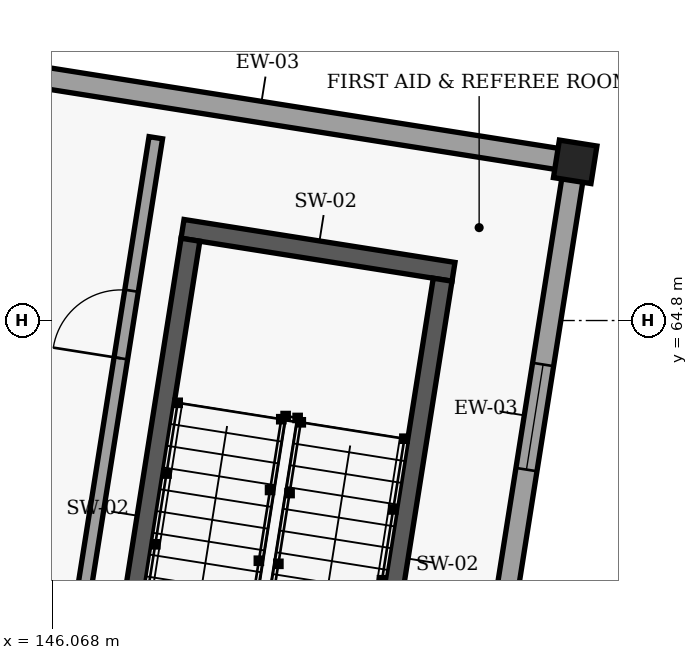
"""IFC4 building model, lengths in metres.
Left out: names, types, materials, properties, quantities, classifications, styles, units other than length and angle.
Written with IfcOpenShell. Run it as: python <this file> out.ifc"""

import sys

from ifc_helpers import new_model, si_unit, direction, frame, frame_2d, origin, origin_2d, place, context, subcontext, project, spatial, rectangle, extrude, element, fill, save


model = new_model("IFC4")
c1 = context("Model", 3, precision=1e-05, world=origin(), true_north=direction((0.0, 1.0)))
c2 = subcontext(c1, "Body", "Model", "MODEL_VIEW")
j1 = project(units=[si_unit("LENGTHUNIT", "METRE"), si_unit("PLANEANGLEUNIT", "RADIAN")], contexts=[c1])
p1 = place(None, origin())
s1 = spatial("IfcSite", under=j1, at=p1, CompositionType="ELEMENT")
p2 = place(p1, origin())
s2 = spatial("IfcBuilding", under=s1, at=p2, CompositionType="ELEMENT")
p3 = place(p2, origin())
s3 = spatial("IfcBuildingStorey", under=s2, at=p3, CompositionType="ELEMENT", Elevation=0.0)
p4 = place(p3, frame((152.949, 66.888, 0.0), z_axis=(0.0, 0.0, 1.0), x_axis=(0.987688340595, -0.15643446504, 0.0)))
e1 = element("IfcColumn", 1, at=p4, inside=s3, PredefinedType="COLUMN", context=c2, shape_type="SweptSolid", body=[
    extrude(rectangle(XDim=0.5, YDim=0.5, at=origin_2d()), origin(), (0.0, 0.0, 1.0), 4.8),
])
p5 = place(p3, frame((151.901, 60.271, 0.0), z_axis=(0.0, 0.0, 1.0), x_axis=(0.156536171909, 0.987672226442, 0.0)))
e2 = element("IfcWall", 2, at=p5, inside=s3, PredefinedType="SOLIDWALL", context=c2, shape_type="SweptSolid", body=[
    extrude(rectangle(XDim=6.6, YDim=0.28, at=frame_2d((3.3, 0.0))), origin(), (0.0, 0.0, 1.0), 3.928),
])
p6 = place(p5, frame((2.6, 0.0, 1.35)))
e3 = element("IfcOpeningElement", 3, at=p6, cuts=e2, PredefinedType="OPENING", context=c2, shape_type="SweptSolid", body=[
    extrude(rectangle(XDim=1.4, YDim=1.2, at=frame_2d((0.7, 0.6))), frame((0.0, 0.15, 0.0), z_axis=(0.0, -1.0, 0.0), x_axis=(1.0, 0.0, 0.0)), (0.0, 0.0, 1.0), 0.3),
])
p7 = place(p3, frame((144.732, 68.189, 0.0), z_axis=(0.0, 0.0, 1.0), x_axis=(0.987704756752, -0.156330782283, 0.0)))
e4 = element("IfcWall", 4, at=p7, inside=s3, PredefinedType="SOLIDWALL", context=c2, shape_type="SweptSolid", body=[
    extrude(rectangle(XDim=8.24, YDim=0.28, at=frame_2d((4.12, 0.0))), origin(), (0.0, 0.0, 1.0), 4.006),
])
p8 = place(p3, frame((147.783, 66.006, 0.0), z_axis=(0.0, 0.0, 1.0), x_axis=(0.987664601714, -0.156584272906, 0.0)))
e5 = element("IfcWall", 5, at=p8, inside=s3, PredefinedType="SHEAR", context=c2, shape_type="SweptSolid", body=[
    extrude(rectangle(XDim=3.609, YDim=0.25, at=frame_2d((1.805, 0.0))), origin(), (0.0, 0.0, 1.0), 4.56),
])
p9 = place(p3, frame((146.731, 58.564, 0.0), z_axis=(0.0, 0.0, 1.0), x_axis=(0.15642738738, 0.98768946156, 0.0)))
e6 = element("IfcWall", 6, at=p9, inside=s3, PredefinedType="SHEAR", context=c2, shape_type="SweptSolid", body=[
    extrude(rectangle(XDim=7.39, YDim=0.25, at=frame_2d((3.695, 0.0))), origin(), (0.0, 0.0, 1.0), 4.56),
])
p10 = place(p3, frame((151.205, 65.337, 0.0), z_axis=(0.0, 0.0, 1.0), x_axis=(-0.156432491725, -0.987688653136, 0.0)))
e7 = element("IfcWall", 7, at=p10, inside=s3, PredefinedType="SHEAR", context=c2, shape_type="SweptSolid", body=[
    extrude(rectangle(XDim=7.39, YDim=0.25, at=frame_2d((3.695, 0.0))), origin(), (0.0, 0.0, 1.0), 4.56),
])
p11 = place(p3, frame((143.348, 41.427, 0.0), z_axis=(0.0, 0.0, 1.0), x_axis=(0.156440506918, 0.987687383637, 0.0)))
e8 = element("IfcWall", 8, at=p11, inside=s3, PredefinedType="PARTITIONING", context=c2, shape_type="SweptSolid", body=[
    extrude(rectangle(XDim=26.099, YDim=0.18, at=frame_2d((13.05, 0.0))), origin(), (0.0, 0.0, 1.0), 4.006),
])
p12 = place(p11, frame((9.575, 0.0, 0.0)))
e9 = element("IfcOpeningElement", 9, at=p12, cuts=e8, PredefinedType="OPENING", context=c2, shape_type="SweptSolid", body=[
    extrude(rectangle(XDim=1.85, YDim=2.22, at=frame_2d((0.925, 1.11))), frame((0.0, 0.1, 0.0), z_axis=(0.0, -1.0, 0.0), x_axis=(1.0, 0.0, 0.0)), (0.0, 0.0, 1.0), 0.2),
])
p13 = place(p11, frame((15.04, 0.0, 0.0)))
e10 = element("IfcOpeningElement", 10, at=p13, cuts=e8, PredefinedType="OPENING", context=c2, shape_type="SweptSolid", body=[
    extrude(rectangle(XDim=1.12, YDim=2.16, at=frame_2d((0.56, 1.08))), frame((0.0, 0.1, 0.0), z_axis=(0.0, -1.0, 0.0), x_axis=(1.0, 0.0, 0.0)), (0.0, 0.0, 1.0), 0.2),
])
p14 = place(p11, frame((3.039, 0.0, 0.0)))
e11 = element("IfcOpeningElement", 11, at=p14, cuts=e8, PredefinedType="OPENING", context=c2, shape_type="SweptSolid", body=[
    extrude(rectangle(XDim=0.9, YDim=2.06, at=frame_2d((0.45, 1.03))), frame((0.0, 0.1, 0.0), z_axis=(0.0, -1.0, 0.0), x_axis=(1.0, 0.0, 0.0)), (0.0, 0.0, 1.0), 0.2),
])
p15 = place(p11, frame((23.161, 0.0, 0.0)))
e12 = element("IfcOpeningElement", 12, at=p15, cuts=e8, PredefinedType="OPENING", context=c2, shape_type="SweptSolid", body=[
    extrude(rectangle(XDim=0.9, YDim=2.06, at=frame_2d((0.45, 1.03))), frame((0.0, 0.1, 0.0), z_axis=(0.0, -1.0, 0.0), x_axis=(1.0, 0.0, 0.0)), (0.0, 0.0, 1.0), 0.2),
])
p16 = place(p6, origin())
e13 = element("IfcWindow", 13, at=p16, inside=s3, PartitioningType="SINGLE_PANEL", PredefinedType="WINDOW", context=c2, shape_type="SweptSolid", body=[
    extrude(rectangle(XDim=1.4, YDim=1.2, at=frame_2d((0.7, 0.6))), frame((0.0, 0.03, 0.0), z_axis=(0.0, -1.0, 0.0), x_axis=(1.0, 0.0, 0.0)), (0.0, 0.0, 1.0), 0.06),
])
fill(e3, e13)
p17 = place(p15, origin())
e14 = element("IfcDoor", 14, at=p17, inside=s3, OperationType="SINGLE_SWING_LEFT", PredefinedType="DOOR", context=c2, shape_type="SweptSolid", body=[
    extrude(rectangle(XDim=0.9, YDim=2.06, at=frame_2d((0.45, 1.03))), frame((0.0, 0.025, 0.0), z_axis=(0.0, -1.0, 0.0), x_axis=(1.0, 0.0, 0.0)), (0.0, 0.0, 1.0), 0.05),
])
fill(e12, e14)
save(model, sys.argv[1])
